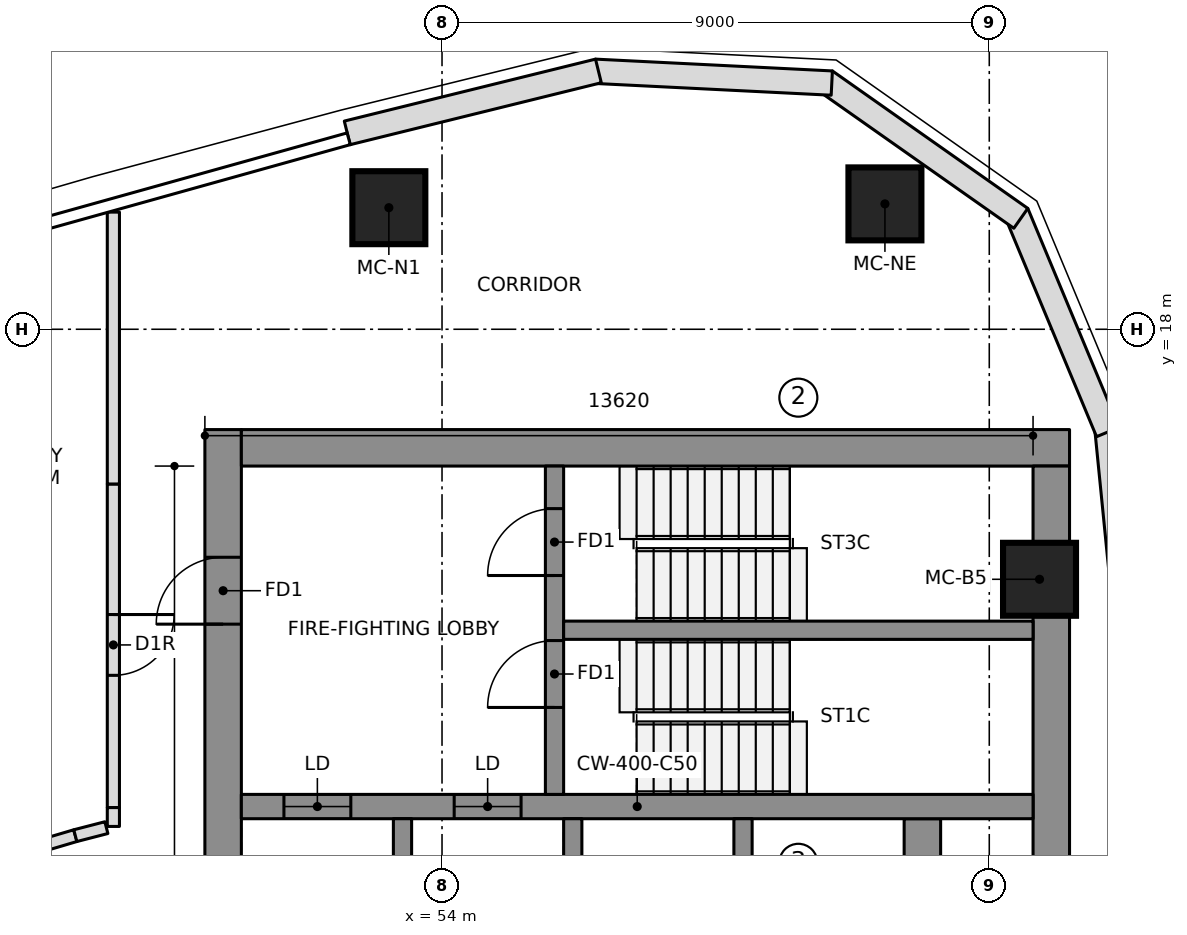
"""IFC4 building model, lengths in metres.
Left out: names, types, materials, properties, quantities, classifications, styles, units other than length and angle.
Written with IfcOpenShell. Run it as: python <this file> out.ifc"""

import sys

from ifc_helpers import new_model, si_unit, direction, frame, frame_2d, origin, origin_2d, place, context, subcontext, project, spatial, polyline, rectangle, outline, extrude, element, fill, save


model = new_model("IFC4")
c1 = context("Model", 3, precision=1e-05, world=origin(), true_north=direction((0.0, 1.0)))
c2 = subcontext(c1, "Body", "Model", "MODEL_VIEW")
j1 = project(units=[si_unit("LENGTHUNIT", "METRE"), si_unit("PLANEANGLEUNIT", "RADIAN")], contexts=[c1])
p1 = place(None, origin())
s1 = spatial("IfcSite", under=j1, at=p1, CompositionType="ELEMENT")
p2 = place(p1, origin())
s2 = spatial("IfcBuilding", under=s1, at=p2, CompositionType="ELEMENT")
p3 = place(p2, frame((0.0, 0.0, 224.35)))
s3 = spatial("IfcBuildingStorey", under=s2, at=p3, CompositionType="ELEMENT", Elevation=224.35)
p4 = place(p3, frame((50.4, 6.65, 0.0), z_axis=(0.0, 0.0, 1.0), x_axis=(0.0, 1.0, 0.0)))
e1 = element("IfcWall", 1, at=p4, inside=s3, PredefinedType="SHEAR", context=c2, shape_type="SweptSolid", body=[
    extrude(rectangle(XDim=9.7, YDim=0.6, at=frame_2d((4.85, 0.0))), origin(), (0.0, 0.0, 1.0), 3.55),
])
p5 = place(p4, frame((6.5, 0.0, 0.0)))
e2 = element("IfcOpeningElement", 2, at=p5, cuts=e1, PredefinedType="OPENING", context=c2, shape_type="SweptSolid", body=[
    extrude(rectangle(XDim=1.1, YDim=2.1, at=frame_2d((0.55, 1.05))), frame((0.0, 0.31, 0.0), z_axis=(0.0, -1.0, 0.0), x_axis=(1.0, 0.0, 0.0)), (0.0, 0.0, 1.0), 0.62),
])
p6 = place(p3, frame((50.7, 16.05, 0.0), z_axis=(0.0, 0.0, 1.0), x_axis=(1.0, 0.0, 0.0)))
e3 = element("IfcWall", 3, at=p6, inside=s3, PredefinedType="SHEAR", context=c2, shape_type="SweptSolid", body=[
    extrude(rectangle(XDim=13.62, YDim=0.6, at=frame_2d((6.81, 0.0))), origin(), (0.0, 0.0, 1.0), 3.55),
])
p7 = place(p3, frame((64.02, 7.502, 0.0), z_axis=(0.0, 0.0, 1.0), x_axis=(0.0, 1.0, 0.0)))
e4 = element("IfcWall", 4, at=p7, inside=s3, PredefinedType="SHEAR", context=c2, shape_type="SweptSolid", body=[
    extrude(rectangle(XDim=8.248, YDim=0.6, at=frame_2d((4.124, 0.0))), origin(), (0.0, 0.0, 1.0), 3.55),
])
p8 = place(p3, frame((61.9, -9.95, 0.0), z_axis=(0.0, 0.0, 1.0), x_axis=(0.0, 1.0, 0.0)))
e5 = element("IfcWall", 5, at=p8, inside=s3, PredefinedType="SHEAR", context=c2, shape_type="SweptSolid", body=[
    extrude(rectangle(XDim=19.9, YDim=0.6, at=frame_2d((9.95, 0.0))), origin(), (0.0, 0.0, 1.0), 3.55),
])
p9 = place(p3, frame((50.7, 10.15, 0.0), z_axis=(0.0, 0.0, 1.0), x_axis=(1.0, 0.0, 0.0)))
e6 = element("IfcWall", 6, at=p9, inside=s3, PredefinedType="SHEAR", context=c2, shape_type="SweptSolid", body=[
    extrude(rectangle(XDim=13.02, YDim=0.4, at=frame_2d((6.51, 0.0))), origin(), (0.0, 0.0, 1.0), 3.55),
])
p10 = place(p9, frame((0.7, 0.0, 0.0)))
e7 = element("IfcOpeningElement", 7, at=p10, cuts=e6, PredefinedType="OPENING", context=c2, shape_type="SweptSolid", body=[
    extrude(rectangle(XDim=1.1, YDim=2.1, at=frame_2d((0.55, 1.05))), frame((0.0, 0.21, 0.0), z_axis=(0.0, -1.0, 0.0), x_axis=(1.0, 0.0, 0.0)), (0.0, 0.0, 1.0), 0.42),
])
p11 = place(p9, frame((3.5, 0.0, 0.0)))
e8 = element("IfcOpeningElement", 8, at=p11, cuts=e6, PredefinedType="OPENING", context=c2, shape_type="SweptSolid", body=[
    extrude(rectangle(XDim=1.1, YDim=2.1, at=frame_2d((0.55, 1.05))), frame((0.0, 0.21, 0.0), z_axis=(0.0, -1.0, 0.0), x_axis=(1.0, 0.0, 0.0)), (0.0, 0.0, 1.0), 0.42),
])
for number, where, z_axis, x_axis in (
    (9, (53.35, 6.95, 0.0), (0.0, 0.0, 1.0), (0.0, 1.0, 0.0)),
    (10, (56.15, 6.95, 0.0), (0.0, 0.0, 1.0), (0.0, 1.0, 0.0)),
    (11, (58.95, 6.95, 0.0), (0.0, 0.0, 1.0), (0.0, 1.0, 0.0)),
):
    element("IfcWall", number, at=place(p3, frame(where, z_axis=z_axis, x_axis=x_axis)), inside=s3, PredefinedType="SHEAR", context=c2, shape_type="SweptSolid", body=[
        extrude(rectangle(XDim=3.0, YDim=0.3, at=frame_2d((1.5, 0.0))), origin(), (0.0, 0.0, 1.0), 3.55),
    ])
p12 = place(p3, frame((55.85, 10.35, 0.0), z_axis=(0.0, 0.0, 1.0), x_axis=(0.0, 1.0, 0.0)))
e12 = element("IfcWall", 12, at=p12, inside=s3, PredefinedType="SHEAR", context=c2, shape_type="SweptSolid", body=[
    extrude(rectangle(XDim=5.4, YDim=0.3, at=frame_2d((2.7, 0.0))), origin(), (0.0, 0.0, 1.0), 3.55),
])
p13 = place(p12, frame((1.43, 0.0, 0.0)))
e13 = element("IfcOpeningElement", 13, at=p13, cuts=e12, PredefinedType="OPENING", context=c2, shape_type="SweptSolid", body=[
    extrude(rectangle(XDim=1.1, YDim=2.1, at=frame_2d((0.55, 1.05))), frame((0.0, 0.16, 0.0), z_axis=(0.0, -1.0, 0.0), x_axis=(1.0, 0.0, 0.0)), (0.0, 0.0, 1.0), 0.32),
])
p14 = place(p12, frame((3.6, 0.0, 0.0)))
e14 = element("IfcOpeningElement", 14, at=p14, cuts=e12, PredefinedType="OPENING", context=c2, shape_type="SweptSolid", body=[
    extrude(rectangle(XDim=1.1, YDim=2.1, at=frame_2d((0.55, 1.05))), frame((0.0, 0.16, 0.0), z_axis=(0.0, -1.0, 0.0), x_axis=(1.0, 0.0, 0.0)), (0.0, 0.0, 1.0), 0.32),
])
p15 = place(p3, frame((56.0, 13.05, 0.0), z_axis=(0.0, 0.0, 1.0), x_axis=(1.0, 0.0, 0.0)))
e15 = element("IfcWall", 15, at=p15, inside=s3, PredefinedType="SHEAR", context=c2, shape_type="SweptSolid", body=[
    extrude(rectangle(XDim=7.72, YDim=0.3, at=frame_2d((3.86, 0.0))), origin(), (0.0, 0.0, 1.0), 3.55),
])
for number, where, z_axis, x_axis in (
    (16, (63.826, 13.888, 0.0), (0.0, 0.0, 1.0), (1.0, 0.0, 0.0)),
    (17, (61.284, 20.062, 0.0), (0.0, 0.0, 1.0), (1.0, 0.0, 0.0)),
    (18, (53.125, 20.0, 0.0), (0.0, 0.0, 1.0), (1.0, 0.0, 0.0)),
):
    element("IfcColumn", number, at=place(p3, frame(where, z_axis=z_axis, x_axis=x_axis)), inside=s3, PredefinedType="COLUMN", context=c2, shape_type="SweptSolid", body=[
        extrude(rectangle(XDim=1.2, YDim=1.2, at=origin_2d()), origin(), (0.0, 0.0, 1.0), 3.55),
    ])
p16 = place(p3, frame((65.342, 12.264, 0.0), z_axis=(0.0, 0.0, 1.0), x_axis=(-0.098718218066, 0.995115427185, 0.0)))
e19 = element("IfcWall", 19, at=p16, inside=s3, PredefinedType="NOTDEFINED", context=c2, shape_type="SweptSolid", body=[
    extrude(outline(polyline([(-0.003, -0.2), (4.123, -0.2), (4.063, 0.2), (0.003, 0.2), (-0.003, -0.2)])), origin(), (0.0, 0.0, 1.0), 3.25),
])
p17 = place(p3, frame((64.938, 16.337, 0.0), z_axis=(0.0, 0.0, 1.0), x_axis=(-0.3844335483, 0.923152667191, 0.0)))
e20 = element("IfcWall", 20, at=p17, inside=s3, PredefinedType="NOTDEFINED", context=c2, shape_type="SweptSolid", body=[
    extrude(outline(polyline([(-0.03, -0.2), (3.871, -0.2), (3.756, 0.2), (0.03, 0.2), (-0.03, -0.2)])), origin(), (0.0, 0.0, 1.0), 3.25),
])
p18 = place(p3, frame((63.471, 19.858, 0.0), z_axis=(0.0, 0.0, 1.0), x_axis=(-0.817942545532, 0.575299915009, 0.0)))
e21 = element("IfcWall", 21, at=p18, inside=s3, PredefinedType="NOTDEFINED", context=c2, shape_type="SweptSolid", body=[
    extrude(outline(polyline([(-0.058, -0.2), (3.871, -0.2), (3.756, 0.2), (0.058, 0.2), (-0.058, -0.2)])), origin(), (0.0, 0.0, 1.0), 3.25),
])
p19 = place(p3, frame((60.352, 22.052, 0.0), z_axis=(0.0, 0.0, 1.0), x_axis=(-0.998758875872, 0.049806705046, 0.0)))
e22 = element("IfcWall", 22, at=p19, inside=s3, PredefinedType="NOTDEFINED", context=c2, shape_type="SweptSolid", body=[
    extrude(outline(polyline([(-0.058, -0.2), (3.843, -0.2), (3.784, 0.2), (0.058, 0.2), (-0.058, -0.2)])), origin(), (0.0, 0.0, 1.0), 3.25),
])
p20 = place(p3, frame((56.543, 22.242, 0.0), z_axis=(0.0, 0.0, 1.0), x_axis=(-0.970902342456, -0.23947576373, 0.0)))
e23 = element("IfcWall", 23, at=p20, inside=s3, PredefinedType="NOTDEFINED", context=c2, shape_type="SweptSolid", body=[
    extrude(outline(polyline([(-0.029, -0.2), (4.226, -0.2), (4.226, 0.2), (0.029, 0.2), (-0.029, -0.2)])), origin(), (0.0, 0.0, 1.0), 3.25),
])
p21 = place(p3, frame((47.969, 9.671, 0.0), z_axis=(0.0, 0.0, 1.0), x_axis=(-0.958867721668, -0.283853293696, 0.0)))
e24 = element("IfcWall", 24, at=p21, inside=s3, PredefinedType="PARTITIONING", context=c2, shape_type="SweptSolid", body=[
    extrude(rectangle(XDim=1.167, YDim=0.2, at=frame_2d((0.583, 0.0))), origin(), (0.0, 0.0, 1.0), 3.25),
])
p22 = place(p3, frame((48.595, 15.455, 0.0), z_axis=(0.0, 0.0, 1.0), x_axis=(0.0, -1.0, 0.0)))
e25 = element("IfcWall", 25, at=p22, inside=s3, PredefinedType="PARTITIONING", context=c2, shape_type="SweptSolid", body=[
    extrude(rectangle(XDim=5.322, YDim=0.2, at=frame_2d((2.661, 0.0))), origin(), (0.0, 0.0, 1.0), 3.25),
])
p23 = place(p22, frame((2.147, 0.0, 0.0)))
e26 = element("IfcOpeningElement", 26, at=p23, cuts=e25, PredefinedType="OPENING", context=c2, shape_type="SweptSolid", body=[
    extrude(rectangle(XDim=1.0, YDim=2.1, at=frame_2d((0.5, 1.05))), frame((0.0, 0.11, 0.0), z_axis=(0.0, -1.0, 0.0), x_axis=(1.0, 0.0, 0.0)), (0.0, 0.0, 1.0), 0.22),
])
p24 = place(p3, frame((48.595, 19.927, 0.0), z_axis=(0.0, 0.0, 1.0), x_axis=(0.0, -1.0, 0.0)))
e27 = element("IfcWall", 27, at=p24, inside=s3, PredefinedType="PARTITIONING", context=c2, shape_type="SweptSolid", body=[
    extrude(rectangle(XDim=4.472, YDim=0.2, at=frame_2d((2.236, 0.0))), origin(), (0.0, 0.0, 1.0), 3.25),
])
p25 = place(p3, frame((48.595, 10.133, 0.0), z_axis=(0.0, 0.0, 1.0), x_axis=(0.0, -1.0, 0.0)))
e28 = element("IfcWall", 28, at=p25, inside=s3, PredefinedType="PARTITIONING", context=c2, shape_type="SweptSolid", body=[
    extrude(rectangle(XDim=0.31, YDim=0.2, at=frame_2d((0.155, 0.0))), origin(), (0.0, 0.0, 1.0), 3.25),
])
p26 = place(p3, frame((48.48, 9.803, 0.0), z_axis=(0.0, 0.0, 1.0), x_axis=(-0.968262872428, -0.249934011047, 0.0)))
e29 = element("IfcWall", 29, at=p26, inside=s3, PredefinedType="PARTITIONING", context=c2, shape_type="SweptSolid", body=[
    extrude(rectangle(XDim=0.528, YDim=0.2, at=frame_2d((0.264, 0.0))), origin(), (0.0, 0.0, 1.0), 3.25),
])
p27 = place(p23, origin())
e30 = element("IfcDoor", 30, at=p27, inside=s3, OperationType="SINGLE_SWING_RIGHT", PredefinedType="DOOR", context=c2, shape_type="SweptSolid", body=[
    extrude(rectangle(XDim=1.0, YDim=2.1, at=frame_2d((0.5, 1.05))), frame((0.0, 0.025, 0.0), z_axis=(0.0, -1.0, 0.0), x_axis=(1.0, 0.0, 0.0)), (0.0, 0.0, 1.0), 0.05),
])
fill(e26, e30)
p28 = place(p10, origin())
e31 = element("IfcDoor", 31, at=p28, inside=s3, OperationType="DOUBLE_DOOR_SLIDING", PredefinedType="DOOR", context=c2, shape_type="SweptSolid", body=[
    extrude(rectangle(XDim=1.1, YDim=2.1, at=frame_2d((0.55, 1.05))), frame((0.0, 0.025, 0.0), z_axis=(0.0, -1.0, 0.0), x_axis=(1.0, 0.0, 0.0)), (0.0, 0.0, 1.0), 0.05),
])
fill(e7, e31)
p29 = place(p11, origin())
e32 = element("IfcDoor", 32, at=p29, inside=s3, OperationType="DOUBLE_DOOR_SLIDING", PredefinedType="DOOR", context=c2, shape_type="SweptSolid", body=[
    extrude(rectangle(XDim=1.1, YDim=2.1, at=frame_2d((0.55, 1.05))), frame((0.0, 0.025, 0.0), z_axis=(0.0, -1.0, 0.0), x_axis=(1.0, 0.0, 0.0)), (0.0, 0.0, 1.0), 0.05),
])
fill(e8, e32)
p30 = place(p13, origin())
e33 = element("IfcDoor", 33, at=p30, inside=s3, OperationType="SINGLE_SWING_RIGHT", PredefinedType="DOOR", context=c2, shape_type="SweptSolid", body=[
    extrude(rectangle(XDim=1.1, YDim=2.1, at=frame_2d((0.55, 1.05))), frame((0.0, 0.025, 0.0), z_axis=(0.0, -1.0, 0.0), x_axis=(1.0, 0.0, 0.0)), (0.0, 0.0, 1.0), 0.05),
])
fill(e13, e33)
p31 = place(p14, origin())
e34 = element("IfcDoor", 34, at=p31, inside=s3, OperationType="SINGLE_SWING_RIGHT", PredefinedType="DOOR", context=c2, shape_type="SweptSolid", body=[
    extrude(rectangle(XDim=1.1, YDim=2.1, at=frame_2d((0.55, 1.05))), frame((0.0, 0.025, 0.0), z_axis=(0.0, -1.0, 0.0), x_axis=(1.0, 0.0, 0.0)), (0.0, 0.0, 1.0), 0.05),
])
fill(e14, e34)
p32 = place(p5, origin())
e35 = element("IfcDoor", 35, at=p32, inside=s3, OperationType="SINGLE_SWING_RIGHT", PredefinedType="DOOR", context=c2, shape_type="SweptSolid", body=[
    extrude(rectangle(XDim=1.1, YDim=2.1, at=frame_2d((0.55, 1.05))), frame((0.0, 0.025, 0.0), z_axis=(0.0, -1.0, 0.0), x_axis=(1.0, 0.0, 0.0)), (0.0, 0.0, 1.0), 0.05),
])
fill(e2, e35)
save(model, sys.argv[1])
